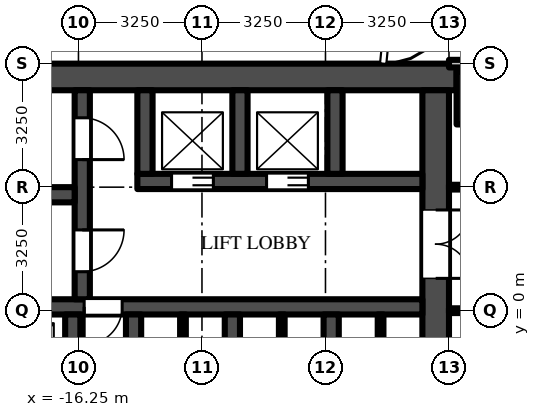
"""IFC4 building model, lengths in metres.
Left out: names, types, materials, properties, quantities, classifications, styles, units other than length and angle.
Written with IfcOpenShell. Run it as: python <this file> out.ifc"""

import sys

from ifc_helpers import new_model, si_unit, direction, frame, frame_2d, origin, origin_2d, place, context, subcontext, project, spatial, rectangle, extrude, source, transform, mapped, element, fill, save


model = new_model("IFC4")
c1 = context("Model", 3, precision=1e-05, world=origin(), true_north=direction((0.0, 1.0)))
c2 = subcontext(c1, "Body", "Model", "MODEL_VIEW")
j1 = project(units=[si_unit("LENGTHUNIT", "METRE"), si_unit("PLANEANGLEUNIT", "RADIAN")], contexts=[c1])
p1 = place(None, origin())
s1 = spatial("IfcSite", under=j1, at=p1, CompositionType="ELEMENT")
p2 = place(p1, origin())
s2 = spatial("IfcBuilding", under=s1, at=p2, CompositionType="ELEMENT")
p3 = place(p2, frame((0.0, 0.0, 52.0)))
s3 = spatial("IfcBuildingStorey", under=s2, at=p3, CompositionType="ELEMENT", Elevation=52.0)
m1 = source(origin(), c2, "Body", "SweptSolid", [
    extrude(rectangle(XDim=1.4, YDim=1.4, at=origin_2d()), origin(), (0.0, 0.0, 1.0), 4.5),
])
p4 = place(p3, frame((-5.6, 5.6, 0.0), z_axis=(0.0, 0.0, 1.0), x_axis=(1.0, 0.0, 0.0)))
e1 = element("IfcColumn", 1, at=p4, inside=s3, PredefinedType="COLUMN", context=c2, shape_type="MappedRepresentation", body=[
    mapped(m1, transform((0.0, 0.0, 0.0))),
])
m2 = source(origin(), c2, "Body", "SweptSolid", [
    extrude(rectangle(XDim=16.45, YDim=0.7, at=frame_2d((8.225, 0.0))), origin(), (0.0, 0.0, 1.0), 4.25),
])
p5 = place(p3, frame((-6.3, 6.15, 0.0), z_axis=(0.0, 0.0, 1.0), x_axis=(-1.0, 0.0, 0.0)))
e2 = element("IfcWall", 2, at=p5, inside=s3, PredefinedType="SHEAR", context=c2, shape_type="MappedRepresentation", body=[
    mapped(m2, transform((0.0, 0.0, 0.0))),
])
m3 = source(origin(), c2, "Body", "SweptSolid", [
    extrude(rectangle(XDim=9.05, YDim=0.7, at=frame_2d((4.525, 0.0))), origin(), (0.0, 0.0, 1.0), 4.25),
])
p6 = place(p3, frame((-6.85, 5.8, 0.0), z_axis=(0.0, 0.0, 1.0), x_axis=(0.0, -1.0, 0.0)))
e3 = element("IfcWall", 3, at=p6, inside=s3, PredefinedType="SHEAR", context=c2, shape_type="MappedRepresentation", body=[
    mapped(m3, transform((0.0, 0.0, 0.0))),
])
m4 = source(origin(), c2, "Body", "SweptSolid", [
    extrude(rectangle(XDim=1.8, YDim=2.1, at=frame_2d((0.9, 1.05))), frame((0.0, 0.36, 0.0), z_axis=(0.0, -1.0, 0.0), x_axis=(1.0, 0.0, 0.0)), (0.0, 0.0, 1.0), 0.72),
])
p7 = place(p6, frame((3.15, 0.0, 0.0)))
e4 = element("IfcOpeningElement", 4, at=p7, cuts=e3, PredefinedType="OPENING", context=c2, shape_type="MappedRepresentation", body=[
    mapped(m4, transform((0.0, 0.0, 0.0))),
])
m5 = source(origin(), c2, "Body", "SweptSolid", [
    extrude(rectangle(XDim=7.5, YDim=0.4, at=frame_2d((3.75, 0.0))), origin(), (0.0, 0.0, 1.0), 4.25),
])
p8 = place(p3, frame((-7.2, 3.4, 0.0), z_axis=(0.0, 0.0, 1.0), x_axis=(-1.0, 0.0, 0.0)))
e5 = element("IfcWall", 5, at=p8, inside=s3, PredefinedType="SHEAR", context=c2, shape_type="MappedRepresentation", body=[
    mapped(m5, transform((0.0, 0.0, 0.0))),
])
m6 = source(origin(), c2, "Body", "SweptSolid", [
    extrude(rectangle(XDim=1.1, YDim=2.1, at=frame_2d((0.55, 1.05))), frame((0.0, 0.21, 0.0), z_axis=(0.0, -1.0, 0.0), x_axis=(1.0, 0.0, 0.0)), (0.0, 0.0, 1.0), 0.42),
])
p9 = place(p8, frame((3.0, 0.0, 0.0)))
e6 = element("IfcOpeningElement", 6, at=p9, cuts=e5, PredefinedType="OPENING", context=c2, shape_type="MappedRepresentation", body=[
    mapped(m6, transform((0.0, 0.0, 0.0))),
])
p10 = place(p8, frame((5.5, 0.0, 0.0)))
e7 = element("IfcOpeningElement", 7, at=p10, cuts=e5, PredefinedType="OPENING", context=c2, shape_type="MappedRepresentation", body=[
    mapped(m6, transform((0.0, 0.0, 0.0))),
])
m7 = source(origin(), c2, "Body", "SweptSolid", [
    extrude(rectangle(XDim=14.85, YDim=0.4, at=frame_2d((7.425, 0.0))), origin(), (0.0, 0.0, 1.0), 4.25),
])
p11 = place(p3, frame((-7.2, 0.1, 0.0), z_axis=(0.0, 0.0, 1.0), x_axis=(-1.0, 0.0, 0.0)))
e8 = element("IfcWall", 8, at=p11, inside=s3, PredefinedType="SHEAR", context=c2, shape_type="MappedRepresentation", body=[
    mapped(m7, transform((0.0, 0.0, 0.0))),
])
m8 = source(origin(), c2, "Body", "SweptSolid", [
    extrude(rectangle(XDim=1.0, YDim=2.1, at=frame_2d((0.5, 1.05))), frame((0.0, 0.21, 0.0), z_axis=(0.0, -1.0, 0.0), x_axis=(1.0, 0.0, 0.0)), (0.0, 0.0, 1.0), 0.42),
])
p12 = place(p11, frame((7.9, 0.0, 0.0)))
e9 = element("IfcOpeningElement", 9, at=p12, cuts=e8, PredefinedType="OPENING", context=c2, shape_type="MappedRepresentation", body=[
    mapped(m8, transform((0.0, 0.0, 0.0))),
])
m9 = source(origin(), c2, "Body", "SweptSolid", [
    extrude(rectangle(XDim=5.5, YDim=0.4, at=frame_2d((2.75, 0.0))), origin(), (0.0, 0.0, 1.0), 4.25),
])
p13 = place(p3, frame((-16.15, 5.8, 0.0), z_axis=(0.0, 0.0, 1.0), x_axis=(0.0, -1.0, 0.0)))
e10 = element("IfcWall", 10, at=p13, inside=s3, PredefinedType="SHEAR", context=c2, shape_type="MappedRepresentation", body=[
    mapped(m9, transform((0.0, 0.0, 0.0))),
])
p14 = place(p13, frame((0.725, 0.0, 0.0)))
e11 = element("IfcOpeningElement", 11, at=p14, cuts=e10, PredefinedType="OPENING", context=c2, shape_type="MappedRepresentation", body=[
    mapped(m6, transform((0.0, 0.0, 0.0))),
])
p15 = place(p13, frame((3.675, 0.0, 0.0)))
e12 = element("IfcOpeningElement", 12, at=p15, cuts=e10, PredefinedType="OPENING", context=c2, shape_type="MappedRepresentation", body=[
    mapped(m6, transform((0.0, 0.0, 0.0))),
])
m10 = source(origin(), c2, "Body", "SweptSolid", [
    extrude(rectangle(XDim=5.7, YDim=0.4, at=frame_2d((2.85, 0.0))), origin(), (0.0, 0.0, 1.0), 4.25),
])
p16 = place(p3, frame((-16.35, 3.05, 0.0), z_axis=(0.0, 0.0, 1.0), x_axis=(-1.0, 0.0, 0.0)))
e13 = element("IfcWall", 13, at=p16, inside=s3, PredefinedType="SHEAR", context=c2, shape_type="MappedRepresentation", body=[
    mapped(m10, transform((0.0, 0.0, 0.0))),
])
m11 = source(origin(), c2, "Body", "SweptSolid", [
    extrude(rectangle(XDim=2.2, YDim=0.4, at=frame_2d((1.1, 0.0))), origin(), (0.0, 0.0, 1.0), 4.25),
])
for number, where, z_axis, x_axis in (
    (14, (-9.5, 5.8, 0.0), (0.0, 0.0, 1.0), (0.0, -1.0, 0.0)),
    (15, (-12.0, 5.8, 0.0), (0.0, 0.0, 1.0), (0.0, -1.0, 0.0)),
    (16, (-14.5, 5.8, 0.0), (0.0, 0.0, 1.0), (0.0, -1.0, 0.0)),
):
    element("IfcWall", number, at=place(p3, frame(where, z_axis=z_axis, x_axis=x_axis)), inside=s3, PredefinedType="SHEAR", context=c2, shape_type="MappedRepresentation", body=[
        mapped(m11, transform((0.0, 0.0, 0.0))),
    ])
m12 = source(origin(), c2, "Body", "SweptSolid", [
    extrude(rectangle(XDim=2.45, YDim=0.4, at=frame_2d((1.225, 0.0))), origin(), (0.0, 0.0, 1.0), 4.25),
])
for number, where, z_axis, x_axis in (
    (17, (-9.6, -0.1, 0.0), (0.0, 0.0, 1.0), (0.0, -1.0, 0.0)),
    (18, (-12.2, -0.1, 0.0), (0.0, 0.0, 1.0), (0.0, -1.0, 0.0)),
    (19, (-14.8, -0.1, 0.0), (0.0, 0.0, 1.0), (0.0, -1.0, 0.0)),
    (20, (-16.4, -0.1, 0.0), (0.0, 0.0, 1.0), (0.0, -1.0, 0.0)),
):
    element("IfcWall", number, at=place(p3, frame(where, z_axis=z_axis, x_axis=x_axis)), inside=s3, PredefinedType="SHEAR", context=c2, shape_type="MappedRepresentation", body=[
        mapped(m12, transform((0.0, 0.0, 0.0))),
    ])
m13 = source(origin(), c2, "Body", "SweptSolid", [
    extrude(rectangle(XDim=2.45, YDim=0.15, at=frame_2d((1.225, 0.0))), origin(), (0.0, 0.0, 1.0), 4.25),
])
for number, where, z_axis, x_axis in (
    (21, (-8.3, -0.1, 0.0), (0.0, 0.0, 1.0), (0.0, -1.0, 0.0)),
    (22, (-10.9, -0.1, 0.0), (0.0, 0.0, 1.0), (0.0, -1.0, 0.0)),
    (23, (-13.5, -0.1, 0.0), (0.0, 0.0, 1.0), (0.0, -1.0, 0.0)),
):
    element("IfcWall", number, at=place(p3, frame(where, z_axis=z_axis, x_axis=x_axis)), inside=s3, PredefinedType="PARTITIONING", context=c2, shape_type="MappedRepresentation", body=[
        mapped(m13, transform((0.0, 0.0, 0.0))),
    ])
m14 = source(origin(), c2, "Body", "SweptSolid", [
    extrude(rectangle(XDim=5.363, YDim=0.125, at=frame_2d((2.681, 0.0))), origin(), (0.0, 0.0, 1.0), 3.468),
])
p17 = place(p3, frame((-1.137, 0.0, 0.0), z_axis=(0.0, 0.0, 1.0), x_axis=(-1.0, 0.0, 0.0)))
e24 = element("IfcWall", 24, at=p17, inside=s3, PredefinedType="PARTITIONING", context=c2, shape_type="MappedRepresentation", body=[
    mapped(m14, transform((0.0, 0.0, 0.0))),
])
p18 = place(p3, frame((-6.5, 3.25, 0.0), z_axis=(0.0, 0.0, 1.0), x_axis=(1.0, 0.0, 0.0)))
e25 = element("IfcWall", 25, at=p18, inside=s3, PredefinedType="PARTITIONING", context=c2, shape_type="MappedRepresentation", body=[
    mapped(m14, transform((0.0, 0.0, 0.0))),
])
m15 = source(origin(), c2, "Body", "SweptSolid", [
    extrude(rectangle(XDim=1.0, YDim=2.1, at=frame_2d((0.5, 1.05))), frame((0.0, 0.073, 0.0), z_axis=(0.0, -1.0, 0.0), x_axis=(1.0, 0.0, 0.0)), (0.0, 0.0, 1.0), 0.145),
])
p19 = place(p18, frame((3.95, 0.0, 0.0)))
e26 = element("IfcOpeningElement", 26, at=p19, cuts=e25, PredefinedType="OPENING", context=c2, shape_type="MappedRepresentation", body=[
    mapped(m15, transform((0.0, 0.0, 0.0))),
])
m16 = source(origin(), c2, "Body", "SweptSolid", [
    extrude(rectangle(XDim=5.363, YDim=0.2, at=frame_2d((2.681, 0.0))), origin(), (0.0, 0.0, 1.0), 3.33),
])
p20 = place(p3, frame((-6.5, 6.5, 0.0), z_axis=(0.0, 0.0, 1.0), x_axis=(1.0, 0.0, 0.0)))
e27 = element("IfcWall", 27, at=p20, inside=s3, PredefinedType="PARTITIONING", context=c2, shape_type="MappedRepresentation", body=[
    mapped(m16, transform((0.0, 0.0, 0.0))),
])
m17 = source(origin(), c2, "Body", "SweptSolid", [
    extrude(rectangle(XDim=1.1, YDim=2.1, at=frame_2d((0.55, 1.05))), frame((0.0, 0.025, 0.0), z_axis=(0.0, -1.0, 0.0), x_axis=(1.0, 0.0, 0.0)), (0.0, 0.0, 1.0), 0.05),
])
p21 = place(p9, origin())
e28 = element("IfcDoor", 28, at=p21, inside=s3, OperationType="DOUBLE_DOOR_SLIDING", PredefinedType="DOOR", context=c2, shape_type="MappedRepresentation", body=[
    mapped(m17, transform((0.0, 0.0, 0.0))),
])
fill(e6, e28)
p22 = place(p10, origin())
e29 = element("IfcDoor", 29, at=p22, inside=s3, OperationType="DOUBLE_DOOR_SLIDING", PredefinedType="DOOR", context=c2, shape_type="MappedRepresentation", body=[
    mapped(m17, transform((0.0, 0.0, 0.0))),
])
fill(e7, e29)
m18 = source(origin(), c2, "Body", "SweptSolid", [
    extrude(rectangle(XDim=1.8, YDim=2.1, at=frame_2d((0.9, 1.05))), frame((0.0, -0.275, 0.0), z_axis=(0.0, -1.0, 0.0), x_axis=(1.0, 0.0, 0.0)), (0.0, 0.0, 1.0), 0.05),
])
p23 = place(p7, origin())
e30 = element("IfcDoor", 30, at=p23, inside=s3, OperationType="DOUBLE_DOOR_SINGLE_SWING", PredefinedType="DOOR", context=c2, shape_type="MappedRepresentation", body=[
    mapped(m18, transform((0.0, 0.0, 0.0))),
])
fill(e4, e30)
p24 = place(p14, origin())
e31 = element("IfcDoor", 31, at=p24, inside=s3, OperationType="SINGLE_SWING_RIGHT", PredefinedType="DOOR", context=c2, shape_type="MappedRepresentation", body=[
    mapped(m17, transform((0.0, 0.0, 0.0))),
])
fill(e11, e31)
p25 = place(p15, origin())
e32 = element("IfcDoor", 32, at=p25, inside=s3, OperationType="SINGLE_SWING_LEFT", PredefinedType="DOOR", context=c2, shape_type="MappedRepresentation", body=[
    mapped(m17, transform((0.0, 0.0, 0.0))),
])
fill(e12, e32)
m19 = source(origin(), c2, "Body", "SweptSolid", [
    extrude(rectangle(XDim=1.0, YDim=2.1, at=frame_2d((0.5, 1.05))), frame((0.0, 0.025, 0.0), z_axis=(0.0, -1.0, 0.0), x_axis=(1.0, 0.0, 0.0)), (0.0, 0.0, 1.0), 0.05),
])
p26 = place(p12, origin())
e33 = element("IfcDoor", 33, at=p26, inside=s3, OperationType="SINGLE_SWING_RIGHT", PredefinedType="DOOR", context=c2, shape_type="MappedRepresentation", body=[
    mapped(m19, transform((0.0, 0.0, 0.0))),
])
fill(e9, e33)
save(model, sys.argv[1])
